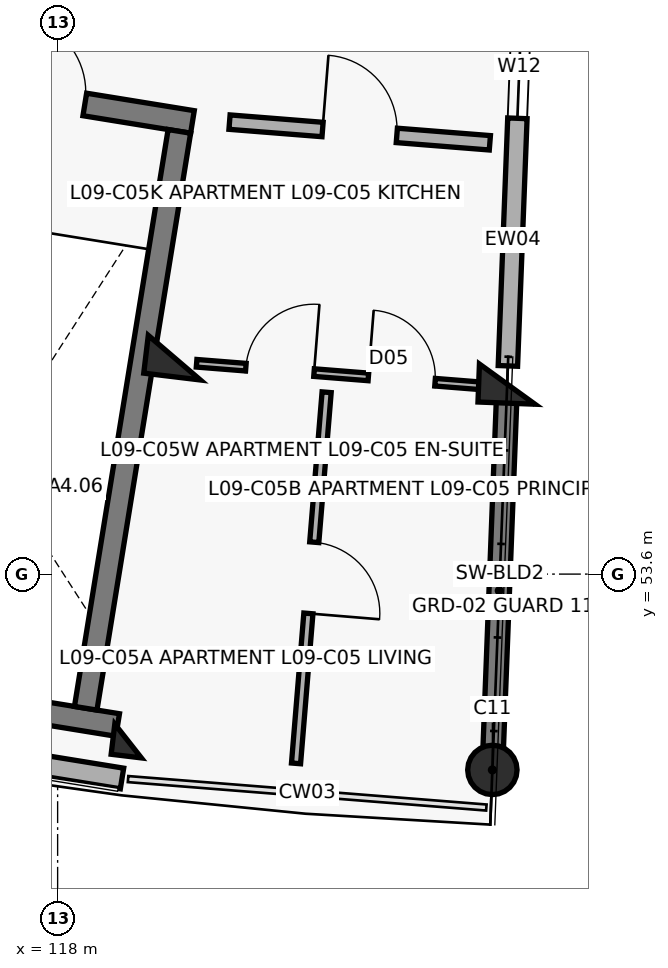
"""IFC4 building model, lengths in metres.
Left out: names, types, materials, properties, quantities, classifications, styles, units other than length and angle.
Written with IfcOpenShell. Run it as: python <this file> out.ifc"""

import sys

from ifc_helpers import new_model, si_unit, direction, frame, frame_2d, origin, origin_2d, place, context, subcontext, project, spatial, rectangle, circle, extrude, element, fill, save


model = new_model("IFC4")
c1 = context("Model", 3, precision=1e-05, world=origin(), true_north=direction((0.0, 1.0)))
c2 = subcontext(c1, "Body", "Model", "MODEL_VIEW")
j1 = project(units=[si_unit("LENGTHUNIT", "METRE"), si_unit("PLANEANGLEUNIT", "RADIAN")], contexts=[c1])
p1 = place(None, origin())
s1 = spatial("IfcSite", under=j1, at=p1, CompositionType="ELEMENT")
p2 = place(p1, origin())
s2 = spatial("IfcBuilding", under=s1, at=p2, CompositionType="ELEMENT")
p3 = place(p2, frame((0.0, 0.0, 29.8)))
s3 = spatial("IfcBuildingStorey", under=s2, at=p3, CompositionType="ELEMENT", Elevation=29.8)
p4 = place(p3, frame((119.535, 56.448, 0.0), z_axis=(0.0, 0.0, 1.0), x_axis=(-0.119790293837, -0.992799217114, 0.0)))
e1 = element("IfcColumn", 1, at=p4, inside=s3, PredefinedType="COLUMN", context=c2, shape_type="SweptSolid", body=[
    extrude(rectangle(XDim=0.5, YDim=0.75, at=origin_2d()), origin(), (0.0, 0.0, 1.0), 3.1),
])
p5 = place(p3, frame((118.927, 51.404, 0.0), z_axis=(0.0, 0.0, 1.0), x_axis=(-0.119790293837, -0.992799217114, 0.0)))
e2 = element("IfcColumn", 2, at=p5, inside=s3, PredefinedType="COLUMN", context=c2, shape_type="SweptSolid", body=[
    extrude(rectangle(XDim=0.4, YDim=0.4, at=origin_2d()), origin(), (0.0, 0.0, 1.0), 3.1),
])
p6 = place(p3, frame((123.915, 56.1, 0.0), z_axis=(0.0, 0.0, 1.0), x_axis=(-0.038387809088, -0.999262916411, 0.0)))
e3 = element("IfcColumn", 3, at=p6, inside=s3, PredefinedType="COLUMN", context=c2, shape_type="SweptSolid", body=[
    extrude(rectangle(XDim=0.5, YDim=0.75, at=origin_2d()), origin(), (0.0, 0.0, 1.0), 3.1),
])
p7 = place(p3, frame((123.72, 51.023, 0.0), z_axis=(0.0, 0.0, 1.0), x_axis=(-0.038387809088, -0.999262916411, 0.0)))
e4 = element("IfcColumn", 4, at=p7, inside=s3, PredefinedType="COLUMN", context=c2, shape_type="SweptSolid", body=[
    extrude(circle(Radius=0.325, at=origin_2d()), origin(), (0.0, 0.0, 1.0), 3.1),
])
p8 = place(p3, frame((123.908, 55.92, 0.0), z_axis=(0.0, 0.0, 1.0), x_axis=(-0.038381471406, -0.99926315986, 0.0)))
e5 = element("IfcWall", 5, at=p8, inside=s3, PredefinedType="SHEAR", context=c2, shape_type="SweptSolid", body=[
    extrude(rectangle(XDim=4.72, YDim=0.27, at=frame_2d((2.36, 0.0))), origin(), (0.0, 0.0, 1.0), 2.92),
])
p9 = place(p3, frame((114.1, 51.681, 0.0), z_axis=(0.0, 0.0, 1.0), x_axis=(0.987080750493, -0.160223568819, 0.0)))
e6 = element("IfcWall", 6, at=p9, inside=s3, PredefinedType="SOLIDWALL", context=c2, shape_type="SweptSolid", body=[
    extrude(rectangle(XDim=4.809, YDim=0.275, at=frame_2d((2.404, 0.0))), origin(), (0.0, 0.0, 1.0), 2.25),
])
p10 = place(p3, frame((124.131, 61.736, 0.0), z_axis=(0.0, 0.0, 1.0), x_axis=(-0.038429649442, -0.999261308189, 0.0)))
e7 = element("IfcWall", 7, at=p10, inside=s3, PredefinedType="SOLIDWALL", context=c2, shape_type="SweptSolid", body=[
    extrude(rectangle(XDim=5.4, YDim=0.255, at=frame_2d((2.7, 0.0))), origin(), (0.0, 0.0, 1.0), 2.24),
])
p11 = place(p10, frame((0.79, 0.0, 0.75)))
e8 = element("IfcOpeningElement", 8, at=p11, cuts=e7, PredefinedType="OPENING", context=c2, shape_type="SweptSolid", body=[
    extrude(rectangle(XDim=1.35, YDim=1.35, at=frame_2d((0.675, 0.675))), frame((0.0, 0.137, 0.0), z_axis=(0.0, -1.0, 0.0), x_axis=(1.0, 0.0, 0.0)), (0.0, 0.0, 1.0), 0.275),
])
p12 = place(p3, frame((115.954, 60.169, 0.0), z_axis=(0.0, 0.0, 1.0), x_axis=(0.987077443397, -0.160243941341, 0.0)))
e9 = element("IfcWall", 9, at=p12, inside=s3, PredefinedType="SHEAR", context=c2, shape_type="SweptSolid", body=[
    extrude(rectangle(XDim=3.87, YDim=0.3, at=frame_2d((1.935, 0.0))), origin(), (0.0, 0.0, 1.0), 3.1),
])
p13 = place(p12, frame((1.435, 0.0, 0.0)))
e10 = element("IfcOpeningElement", 10, at=p13, cuts=e9, PredefinedType="OPENING", context=c2, shape_type="SweptSolid", body=[
    extrude(rectangle(XDim=1.0, YDim=2.15, at=frame_2d((0.5, 1.075))), frame((0.0, 0.16, 0.0), z_axis=(0.0, -1.0, 0.0), x_axis=(1.0, 0.0, 0.0)), (0.0, 0.0, 1.0), 0.32),
])
p14 = place(p3, frame((114.377, 52.331, 0.0), z_axis=(0.0, 0.0, 1.0), x_axis=(0.987077474317, -0.16024375088, 0.0)))
e11 = element("IfcWall", 11, at=p14, inside=s3, PredefinedType="SHEAR", context=c2, shape_type="SweptSolid", body=[
    extrude(rectangle(XDim=4.47, YDim=0.3, at=frame_2d((2.235, 0.0))), origin(), (0.0, 0.0, 1.0), 3.1),
])
p15 = place(p3, frame((119.602, 59.425, 0.0), z_axis=(0.0, 0.0, 1.0), x_axis=(-0.160201584773, -0.987084318706, 0.0)))
e12 = element("IfcWall", 12, at=p15, inside=s3, PredefinedType="SHEAR", context=c2, shape_type="SweptSolid", body=[
    extrude(rectangle(XDim=7.69, YDim=0.3, at=frame_2d((3.845, 0.0))), origin(), (0.0, 0.0, 1.0), 3.1),
])
p16 = place(p3, frame((120.261, 59.547, 0.0), z_axis=(0.0, 0.0, 1.0), x_axis=(0.996862545573, -0.079152165058, 0.0)))
e13 = element("IfcWall", 13, at=p16, inside=s3, PredefinedType="SOLIDWALL", context=c2, shape_type="SweptSolid", body=[
    extrude(rectangle(XDim=3.436, YDim=0.19, at=frame_2d((1.718, 0.0))), origin(), (0.0, 0.0, 1.0), 2.14),
])
p17 = place(p16, frame((1.228, 0.0, 0.0)))
e14 = element("IfcOpeningElement", 14, at=p17, cuts=e13, PredefinedType="OPENING", context=c2, shape_type="SweptSolid", body=[
    extrude(rectangle(XDim=0.98, YDim=2.15, at=frame_2d((0.49, 1.075))), frame((0.0, 0.105, 0.0), z_axis=(0.0, -1.0, 0.0), x_axis=(1.0, 0.0, 0.0)), (0.0, 0.0, 1.0), 0.21),
])
p18 = place(p3, frame((119.828, 56.374, 0.0), z_axis=(0.0, 0.0, 1.0), x_axis=(0.996863138536, -0.079144696778, 0.0)))
e15 = element("IfcWall", 15, at=p18, inside=s3, PredefinedType="PARTITIONING", context=c2, shape_type="SweptSolid", body=[
    extrude(rectangle(XDim=3.797, YDim=0.1, at=frame_2d((1.899, 0.0))), origin(), (0.0, 0.0, 1.0), 2.14),
])
p19 = place(p18, frame((0.65, 0.0, 0.0)))
e16 = element("IfcOpeningElement", 16, at=p19, cuts=e15, PredefinedType="OPENING", context=c2, shape_type="SweptSolid", body=[
    extrude(rectangle(XDim=0.9, YDim=2.1, at=frame_2d((0.45, 1.05))), frame((0.0, 0.06, 0.0), z_axis=(0.0, -1.0, 0.0), x_axis=(1.0, 0.0, 0.0)), (0.0, 0.0, 1.0), 0.12),
])
p20 = place(p18, frame((2.267, 0.0, 0.0)))
e17 = element("IfcOpeningElement", 17, at=p20, cuts=e15, PredefinedType="OPENING", context=c2, shape_type="SweptSolid", body=[
    extrude(rectangle(XDim=0.88, YDim=2.1, at=frame_2d((0.44, 1.05))), frame((0.0, 0.06, 0.0), z_axis=(0.0, -1.0, 0.0), x_axis=(1.0, 0.0, 0.0)), (0.0, 0.0, 1.0), 0.12),
])
p21 = place(p3, frame((121.539, 55.993, 0.0), z_axis=(0.0, 0.0, 1.0), x_axis=(-0.082163012317, -0.996618903798, 0.0)))
e18 = element("IfcWall", 18, at=p21, inside=s3, PredefinedType="PARTITIONING", context=c2, shape_type="SweptSolid", body=[
    extrude(rectangle(XDim=4.9, YDim=0.12, at=frame_2d((2.45, 0.0))), origin(), (0.0, 0.0, 1.0), 2.14),
])
p22 = place(p21, frame((1.98, 0.0, 0.0)))
e19 = element("IfcOpeningElement", 19, at=p22, cuts=e18, PredefinedType="OPENING", context=c2, shape_type="SweptSolid", body=[
    extrude(rectangle(XDim=0.94, YDim=2.1, at=frame_2d((0.47, 1.05))), frame((0.0, 0.07, 0.0), z_axis=(0.0, -1.0, 0.0), x_axis=(1.0, 0.0, 0.0)), (0.0, 0.0, 1.0), 0.14),
])
p23 = place(p11, origin())
e20 = element("IfcWindow", 20, at=p23, inside=s3, PartitioningType="DOUBLE_PANEL_VERTICAL", PredefinedType="WINDOW", context=c2, shape_type="SweptSolid", body=[
    extrude(rectangle(XDim=1.35, YDim=1.35, at=frame_2d((0.675, 0.675))), frame((0.0, 0.03, 0.0), z_axis=(0.0, -1.0, 0.0), x_axis=(1.0, 0.0, 0.0)), (0.0, 0.0, 1.0), 0.06),
])
fill(e8, e20)
p24 = place(p13, origin())
e21 = element("IfcDoor", 21, at=p24, inside=s3, OperationType="SINGLE_SWING_LEFT", PredefinedType="DOOR", context=c2, shape_type="SweptSolid", body=[
    extrude(rectangle(XDim=1.0, YDim=2.15, at=frame_2d((0.5, 1.075))), frame((0.0, 0.025, 0.0), z_axis=(0.0, -1.0, 0.0), x_axis=(1.0, 0.0, 0.0)), (0.0, 0.0, 1.0), 0.05),
])
fill(e10, e21)
p25 = place(p17, origin())
e22 = element("IfcDoor", 22, at=p25, inside=s3, OperationType="SINGLE_SWING_LEFT", PredefinedType="DOOR", context=c2, shape_type="SweptSolid", body=[
    extrude(rectangle(XDim=0.98, YDim=2.15, at=frame_2d((0.49, 1.075))), frame((0.0, 0.025, 0.0), z_axis=(0.0, -1.0, 0.0), x_axis=(1.0, 0.0, 0.0)), (0.0, 0.0, 1.0), 0.05),
])
fill(e14, e22)
p26 = place(p19, origin())
e23 = element("IfcDoor", 23, at=p26, inside=s3, OperationType="SINGLE_SWING_RIGHT", PredefinedType="DOOR", context=c2, shape_type="SweptSolid", body=[
    extrude(rectangle(XDim=0.9, YDim=2.1, at=frame_2d((0.45, 1.05))), frame((0.0, 0.025, 0.0), z_axis=(0.0, -1.0, 0.0), x_axis=(1.0, 0.0, 0.0)), (0.0, 0.0, 1.0), 0.05),
])
fill(e16, e23)
p27 = place(p20, origin())
e24 = element("IfcDoor", 24, at=p27, inside=s3, OperationType="SINGLE_SWING_LEFT", PredefinedType="DOOR", context=c2, shape_type="SweptSolid", body=[
    extrude(rectangle(XDim=0.88, YDim=2.1, at=frame_2d((0.44, 1.05))), frame((0.0, 0.025, 0.0), z_axis=(0.0, -1.0, 0.0), x_axis=(1.0, 0.0, 0.0)), (0.0, 0.0, 1.0), 0.05),
])
fill(e17, e24)
p28 = place(p22, origin())
e25 = element("IfcDoor", 25, at=p28, inside=s3, OperationType="SINGLE_SWING_RIGHT", PredefinedType="DOOR", context=c2, shape_type="SweptSolid", body=[
    extrude(rectangle(XDim=0.94, YDim=2.1, at=frame_2d((0.47, 1.05))), frame((0.0, 0.025, 0.0), z_axis=(0.0, -1.0, 0.0), x_axis=(1.0, 0.0, 0.0)), (0.0, 0.0, 1.0), 0.05),
])
fill(e19, e25)
save(model, sys.argv[1])
